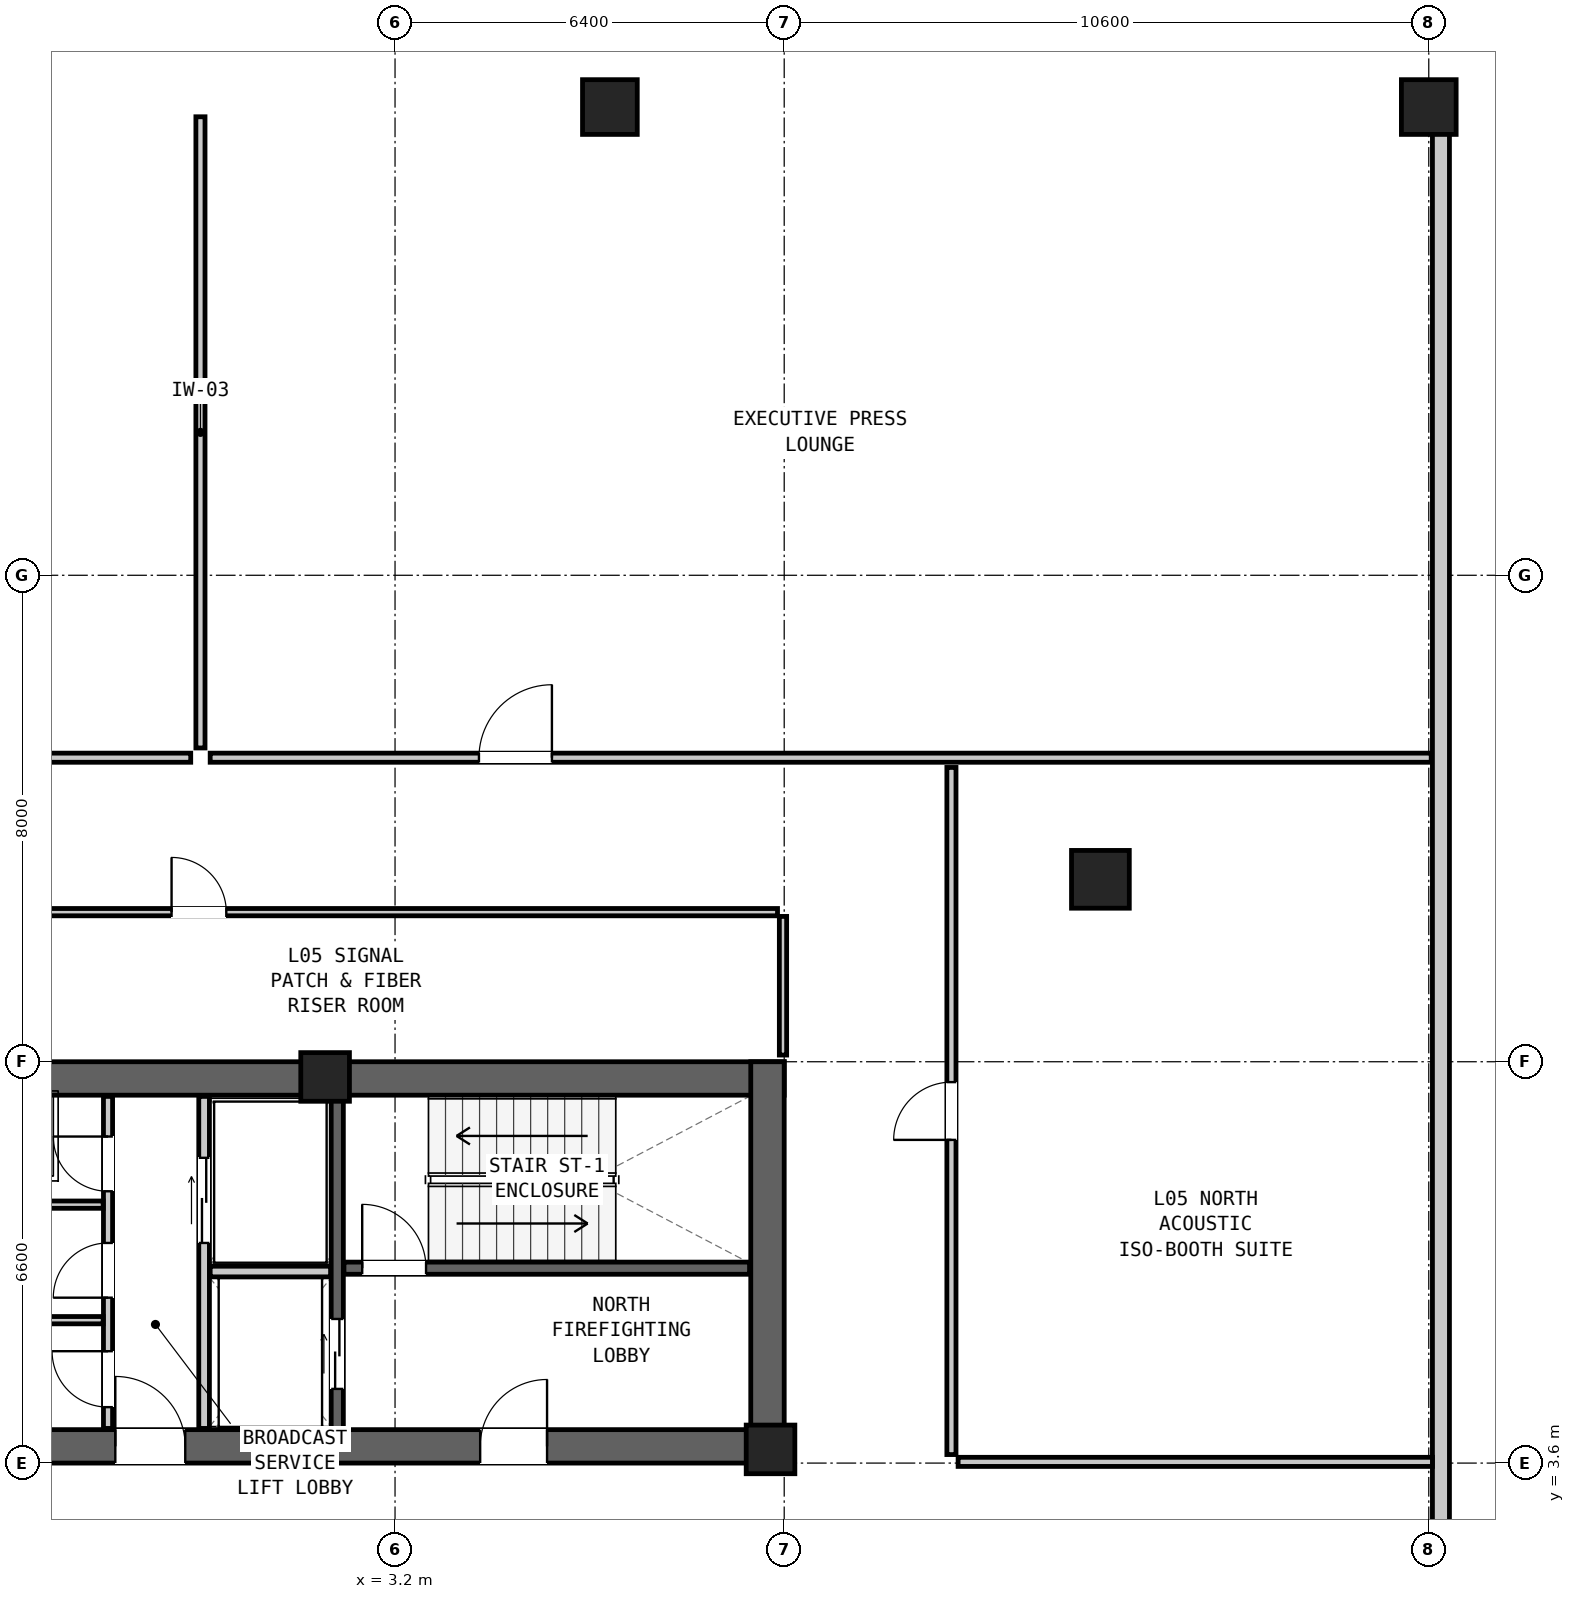
"""IFC4 building model, lengths in metres.
Left out: names, types, materials, properties, quantities, classifications, styles, units other than length and angle.
Written with IfcOpenShell. Run it as: python <this file> out.ifc"""

import sys

from ifc_helpers import new_model, si_unit, direction, frame, frame_2d, origin, origin_2d, place, context, subcontext, project, spatial, rectangle, hollow_rectangle, extrude, element, fill, save


model = new_model("IFC4")
c1 = context("Model", 3, precision=1e-05, world=origin(), true_north=direction((0.0, 1.0)))
c2 = subcontext(c1, "Body", "Model", "MODEL_VIEW")
j1 = project(units=[si_unit("LENGTHUNIT", "METRE"), si_unit("PLANEANGLEUNIT", "RADIAN")], contexts=[c1])
p1 = place(None, origin())
s1 = spatial("IfcSite", under=j1, at=p1, CompositionType="ELEMENT")
p2 = place(p1, origin())
s2 = spatial("IfcBuilding", under=s1, at=p2, CompositionType="ELEMENT")
p3 = place(p2, frame((0.0, 0.0, 21.9)))
s3 = spatial("IfcBuildingStorey", under=s2, at=p3, CompositionType="ELEMENT", Elevation=21.9)
p4 = place(p3, frame((-9.6, 9.925, 0.0), z_axis=(0.0, 0.0, 1.0), x_axis=(1.0, 0.0, 0.0)))
e1 = element("IfcWall", 1, at=p4, inside=s3, PredefinedType="SHEAR", context=c2, shape_type="SweptSolid", body=[
    extrude(rectangle(XDim=19.2, YDim=0.55, at=frame_2d((9.6, 0.0))), origin(), (0.0, 0.0, 1.0), 4.2),
])
p5 = place(p3, frame((-9.6, 3.875, 0.0), z_axis=(0.0, 0.0, 1.0), x_axis=(1.0, 0.0, 0.0)))
e2 = element("IfcWall", 2, at=p5, inside=s3, PredefinedType="SHEAR", context=c2, shape_type="SweptSolid", body=[
    extrude(rectangle(XDim=19.2, YDim=0.55, at=frame_2d((9.6, 0.0))), origin(), (0.0, 0.0, 1.0), 4.2),
])
p6 = place(p5, frame((14.2, 0.0, 0.0)))
e3 = element("IfcOpeningElement", 3, at=p6, cuts=e2, PredefinedType="OPENING", context=c2, shape_type="SweptSolid", body=[
    extrude(rectangle(XDim=1.1, YDim=2.08, at=frame_2d((0.55, 1.04))), frame((0.0, 0.287, 0.0), z_axis=(0.0, -1.0, 0.0), x_axis=(1.0, 0.0, 0.0)), (0.0, 0.0, 1.0), 0.574),
])
p7 = place(p5, frame((8.2, 0.0, 0.0)))
e4 = element("IfcOpeningElement", 4, at=p7, cuts=e2, PredefinedType="OPENING", context=c2, shape_type="SweptSolid", body=[
    extrude(rectangle(XDim=1.15, YDim=2.1, at=frame_2d((0.575, 1.05))), frame((0.0, 0.287, 0.0), z_axis=(0.0, -1.0, 0.0), x_axis=(1.0, 0.0, 0.0)), (0.0, 0.0, 1.0), 0.574),
])
p8 = place(p5, frame((0.9, 0.0, 0.0)))
e5 = element("IfcOpeningElement", 5, at=p8, cuts=e2, PredefinedType="OPENING", context=c2, shape_type="SweptSolid", body=[
    extrude(rectangle(XDim=0.95, YDim=2.1, at=frame_2d((0.475, 1.05))), frame((0.0, 0.287, 0.0), z_axis=(0.0, -1.0, 0.0), x_axis=(1.0, 0.0, 0.0)), (0.0, 0.0, 1.0), 0.574),
])
p9 = place(p5, frame((3.6, 0.0, 0.0)))
e6 = element("IfcOpeningElement", 6, at=p9, cuts=e2, PredefinedType="OPENING", context=c2, shape_type="SweptSolid", body=[
    extrude(rectangle(XDim=1.6, YDim=2.12, at=frame_2d((0.8, 1.06))), frame((0.0, 0.287, 0.0), z_axis=(0.0, -1.0, 0.0), x_axis=(1.0, 0.0, 0.0)), (0.0, 0.0, 1.0), 0.574),
])
p10 = place(p3, frame((9.325, 3.6, 0.0), z_axis=(0.0, 0.0, 1.0), x_axis=(0.0, 1.0, 0.0)))
e7 = element("IfcWall", 7, at=p10, inside=s3, PredefinedType="SHEAR", context=c2, shape_type="SweptSolid", body=[
    extrude(rectangle(XDim=6.6, YDim=0.55, at=frame_2d((3.3, 0.0))), origin(), (0.0, 0.0, 1.0), 4.2),
])
p11 = place(p3, frame((14.8, 13.2, 0.0), z_axis=(0.0, 0.0, 1.0), x_axis=(1.0, 0.0, 0.0)))
e8 = element("IfcColumn", 8, at=p11, inside=s3, PredefinedType="COLUMN", context=c2, shape_type="SweptSolid", body=[
    extrude(hollow_rectangle(XDim=0.95, YDim=0.95, WallThickness=0.06, at=origin_2d()), origin(), (0.0, 0.0, 1.0), 4.2),
])
for number, where, z_axis, x_axis in (
    (9, (20.2, 25.9, 0.0), (0.0, 0.0, 1.0), (1.0, 0.0, 0.0)),
    (10, (6.733, 25.9, 0.0), (0.0, 0.0, 1.0), (1.0, 0.0, 0.0)),
):
    element("IfcColumn", number, at=place(p3, frame(where, z_axis=z_axis, x_axis=x_axis)), inside=s3, PredefinedType="COLUMN", context=c2, shape_type="SweptSolid", body=[
        extrude(hollow_rectangle(XDim=0.9, YDim=0.9, WallThickness=0.055, at=origin_2d()), origin(), (0.0, 0.0, 1.0), 4.2),
    ])
for number, where, z_axis, x_axis in (
    (11, (2.05, 9.95, 0.0), (0.0, 0.0, 1.0), (1.0, 0.0, 0.0)),
    (12, (9.375, 3.825, 0.0), (0.0, 0.0, 1.0), (1.0, 0.0, 0.0)),
):
    element("IfcColumn", number, at=place(p3, frame(where, z_axis=z_axis, x_axis=x_axis)), inside=s3, PredefinedType="COLUMN", context=c2, shape_type="SweptSolid", body=[
        extrude(rectangle(XDim=0.8, YDim=0.8, at=origin_2d()), origin(), (0.0, 0.0, 1.0), 4.2),
    ])
p12 = place(p3, frame((2.36, 6.805, 0.0), z_axis=(0.0, 0.0, 1.0), x_axis=(1.0, 0.0, 0.0)))
e13 = element("IfcWall", 13, at=p12, inside=s3, PredefinedType="SHEAR", context=c2, shape_type="SweptSolid", body=[
    extrude(rectangle(XDim=6.67, YDim=0.2, at=frame_2d((3.335, 0.0))), origin(), (0.0, 0.0, 1.0), 3.98),
])
p13 = place(p12, frame((0.3, 0.0, 0.0)))
e14 = element("IfcOpeningElement", 14, at=p13, cuts=e13, PredefinedType="OPENING", context=c2, shape_type="SweptSolid", body=[
    extrude(rectangle(XDim=1.05, YDim=2.08, at=frame_2d((0.525, 1.04))), frame((0.0, 0.112, 0.0), z_axis=(0.0, -1.0, 0.0), x_axis=(1.0, 0.0, 0.0)), (0.0, 0.0, 1.0), 0.224),
])
p14 = place(p3, frame((2.25, 4.17, 0.0), z_axis=(0.0, 0.0, 1.0), x_axis=(0.0, 1.0, 0.0)))
e15 = element("IfcWall", 15, at=p14, inside=s3, PredefinedType="SHEAR", context=c2, shape_type="SweptSolid", body=[
    extrude(rectangle(XDim=5.46, YDim=0.2, at=frame_2d((2.73, 0.0))), origin(), (0.0, 0.0, 1.0), 3.98),
])
p15 = place(p14, frame((0.65, 0.0, 0.0)))
e16 = element("IfcOpeningElement", 16, at=p15, cuts=e15, PredefinedType="OPENING", context=c2, shape_type="SweptSolid", body=[
    extrude(rectangle(XDim=1.15, YDim=2.08, at=frame_2d((0.575, 1.04))), frame((0.0, 0.112, 0.0), z_axis=(0.0, -1.0, 0.0), x_axis=(1.0, 0.0, 0.0)), (0.0, 0.0, 1.0), 0.224),
])
p16 = place(p3, frame((0.06, 4.17, 0.0), z_axis=(0.0, 0.0, 1.0), x_axis=(0.0, 1.0, 0.0)))
e17 = element("IfcWall", 17, at=p16, inside=s3, PredefinedType="PARTITIONING", context=c2, shape_type="SweptSolid", body=[
    extrude(rectangle(XDim=5.46, YDim=0.175, at=frame_2d((2.73, 0.0))), origin(), (0.0, 0.0, 1.0), 3.98),
])
p17 = place(p16, frame((3.05, 0.0, 0.0)))
e18 = element("IfcOpeningElement", 18, at=p17, cuts=e17, PredefinedType="OPENING", context=c2, shape_type="SweptSolid", body=[
    extrude(rectangle(XDim=1.4, YDim=2.12, at=frame_2d((0.7, 1.06))), frame((0.0, 0.1, 0.0), z_axis=(0.0, -1.0, 0.0), x_axis=(1.0, 0.0, 0.0)), (0.0, 0.0, 1.0), 0.199),
])
p18 = place(p3, frame((0.16, 6.75, 0.0), z_axis=(0.0, 0.0, 1.0), x_axis=(1.0, 0.0, 0.0)))
e19 = element("IfcWall", 19, at=p18, inside=s3, PredefinedType="PARTITIONING", context=c2, shape_type="SweptSolid", body=[
    extrude(rectangle(XDim=1.98, YDim=0.175, at=frame_2d((0.99, 0.0))), origin(), (0.0, 0.0, 1.0), 3.98),
])
p19 = place(p3, frame((-1.52, 4.17, 0.0), z_axis=(0.0, 0.0, 1.0), x_axis=(0.0, 1.0, 0.0)))
e20 = element("IfcWall", 20, at=p19, inside=s3, PredefinedType="PARTITIONING", context=c2, shape_type="SweptSolid", body=[
    extrude(rectangle(XDim=5.46, YDim=0.15, at=frame_2d((2.73, 0.0))), origin(), (0.0, 0.0, 1.0), 3.98),
])
p20 = place(p19, frame((3.9, 0.0, 0.0)))
e21 = element("IfcOpeningElement", 21, at=p20, cuts=e20, PredefinedType="OPENING", context=c2, shape_type="SweptSolid", body=[
    extrude(rectangle(XDim=0.9, YDim=2.05, at=frame_2d((0.45, 1.025))), frame((0.0, 0.087, 0.0), z_axis=(0.0, -1.0, 0.0), x_axis=(1.0, 0.0, 0.0)), (0.0, 0.0, 1.0), 0.174),
])
p21 = place(p19, frame((2.15, 0.0, 0.0)))
e22 = element("IfcOpeningElement", 22, at=p21, cuts=e20, PredefinedType="OPENING", context=c2, shape_type="SweptSolid", body=[
    extrude(rectangle(XDim=0.9, YDim=2.05, at=frame_2d((0.45, 1.025))), frame((0.0, 0.087, 0.0), z_axis=(0.0, -1.0, 0.0), x_axis=(1.0, 0.0, 0.0)), (0.0, 0.0, 1.0), 0.174),
])
p22 = place(p19, frame((0.35, 0.0, 0.0)))
e23 = element("IfcOpeningElement", 23, at=p22, cuts=e20, PredefinedType="OPENING", context=c2, shape_type="SweptSolid", body=[
    extrude(rectangle(XDim=0.92, YDim=2.1, at=frame_2d((0.46, 1.05))), frame((0.0, 0.087, 0.0), z_axis=(0.0, -1.0, 0.0), x_axis=(1.0, 0.0, 0.0)), (0.0, 0.0, 1.0), 0.174),
])
for number, where, z_axis, x_axis in (
    (24, (-2.96, 5.95, 0.0), (0.0, 0.0, 1.0), (1.0, 0.0, 0.0)),
    (25, (-2.96, 7.85, 0.0), (0.0, 0.0, 1.0), (1.0, 0.0, 0.0)),
):
    element("IfcWall", number, at=place(p3, frame(where, z_axis=z_axis, x_axis=x_axis)), inside=s3, PredefinedType="PARTITIONING", context=c2, shape_type="SweptSolid", body=[
        extrude(rectangle(XDim=1.36, YDim=0.12, at=frame_2d((0.68, 0.0))), origin(), (0.0, 0.0, 1.0), 3.98),
    ])
p23 = place(p3, frame((20.4, -25.74, 0.0), z_axis=(0.0, 0.0, 1.0), x_axis=(0.0, 1.0, 0.0)))
e26 = element("IfcWall", 26, at=p23, inside=s3, PredefinedType="MOVABLE", context=c2, shape_type="SweptSolid", body=[
    extrude(rectangle(XDim=51.48, YDim=0.28, at=frame_2d((25.74, 0.0))), origin(), (0.0, 0.0, 1.0), 3.98),
])
p24 = place(p23, frame((25.255, 0.0, 0.0)))
e27 = element("IfcOpeningElement", 27, at=p24, cuts=e26, PredefinedType="OPENING", context=c2, shape_type="SweptSolid", body=[
    extrude(rectangle(XDim=2.0, YDim=2.14, at=frame_2d((1.0, 1.07))), frame((0.0, 0.152, 0.0), z_axis=(0.0, -1.0, 0.0), x_axis=(1.0, 0.0, 0.0)), (0.0, 0.0, 1.0), 0.304),
])
p25 = place(p3, frame((-28.24, 15.2, 0.0), z_axis=(0.0, 0.0, 1.0), x_axis=(1.0, 0.0, 0.0)))
e28 = element("IfcWall", 28, at=p25, inside=s3, PredefinedType="PARTITIONING", context=c2, shape_type="SweptSolid", body=[
    extrude(rectangle(XDim=28.08, YDim=0.15, at=frame_2d((14.04, 0.0))), origin(), (0.0, 0.0, 1.0), 3.98),
])
p26 = place(p25, frame((21.302, 0.0, 0.0)))
e29 = element("IfcOpeningElement", 29, at=p26, cuts=e28, PredefinedType="OPENING", context=c2, shape_type="SweptSolid", body=[
    extrude(rectangle(XDim=1.2, YDim=2.1, at=frame_2d((0.6, 1.05))), frame((0.0, 0.087, 0.0), z_axis=(0.0, -1.0, 0.0), x_axis=(1.0, 0.0, 0.0)), (0.0, 0.0, 1.0), 0.174),
])
p27 = place(p3, frame((0.16, 15.2, 0.0), z_axis=(0.0, 0.0, 1.0), x_axis=(1.0, 0.0, 0.0)))
e30 = element("IfcWall", 30, at=p27, inside=s3, PredefinedType="PARTITIONING", context=c2, shape_type="SweptSolid", body=[
    extrude(rectangle(XDim=20.08, YDim=0.15, at=frame_2d((10.04, 0.0))), origin(), (0.0, 0.0, 1.0), 3.98),
])
p28 = place(p27, frame((4.42, 0.0, 0.0)))
e31 = element("IfcOpeningElement", 31, at=p28, cuts=e30, PredefinedType="OPENING", context=c2, shape_type="SweptSolid", body=[
    extrude(rectangle(XDim=1.2, YDim=2.1, at=frame_2d((0.6, 1.05))), frame((0.0, 0.087, 0.0), z_axis=(0.0, -1.0, 0.0), x_axis=(1.0, 0.0, 0.0)), (0.0, 0.0, 1.0), 0.174),
])
p29 = place(p3, frame((0.0, 15.36, 0.0), z_axis=(0.0, 0.0, 1.0), x_axis=(0.0, 1.0, 0.0)))
e32 = element("IfcWall", 32, at=p29, inside=s3, PredefinedType="PARTITIONING", context=c2, shape_type="SweptSolid", body=[
    extrude(rectangle(XDim=10.38, YDim=0.15, at=frame_2d((5.19, 0.0))), origin(), (0.0, 0.0, 1.0), 3.424),
])
p30 = place(p3, frame((12.35, 3.74, 0.0), z_axis=(0.0, 0.0, 1.0), x_axis=(0.0, 1.0, 0.0)))
e33 = element("IfcWall", 33, at=p30, inside=s3, PredefinedType="PARTITIONING", context=c2, shape_type="SweptSolid", body=[
    extrude(rectangle(XDim=11.3, YDim=0.15, at=frame_2d((5.65, 0.0))), origin(), (0.0, 0.0, 1.0), 3.98),
])
p31 = place(p30, frame((5.175, 0.0, 0.0)))
e34 = element("IfcOpeningElement", 34, at=p31, cuts=e33, PredefinedType="OPENING", context=c2, shape_type="SweptSolid", body=[
    extrude(rectangle(XDim=0.95, YDim=2.1, at=frame_2d((0.475, 1.05))), frame((0.0, 0.087, 0.0), z_axis=(0.0, -1.0, 0.0), x_axis=(1.0, 0.0, 0.0)), (0.0, 0.0, 1.0), 0.174),
])
p32 = place(p3, frame((12.46, 3.62, 0.0), z_axis=(0.0, 0.0, 1.0), x_axis=(1.0, 0.0, 0.0)))
e35 = element("IfcWall", 35, at=p32, inside=s3, PredefinedType="PARTITIONING", context=c2, shape_type="SweptSolid", body=[
    extrude(rectangle(XDim=7.8, YDim=0.15, at=frame_2d((3.9, 0.0))), origin(), (0.0, 0.0, 1.0), 2.949),
])
p33 = place(p3, frame((-9.49, 12.66, 0.0), z_axis=(0.0, 0.0, 1.0), x_axis=(1.0, 0.0, 0.0)))
e36 = element("IfcWall", 36, at=p33, inside=s3, PredefinedType="PARTITIONING", context=c2, shape_type="SweptSolid", body=[
    extrude(rectangle(XDim=18.98, YDim=0.12, at=frame_2d((9.49, 0.0))), origin(), (0.0, 0.0, 1.0), 3.98),
])
p34 = place(p33, frame((9.015, 0.0, 0.0)))
e37 = element("IfcOpeningElement", 37, at=p34, cuts=e36, PredefinedType="OPENING", context=c2, shape_type="SweptSolid", body=[
    extrude(rectangle(XDim=0.9, YDim=2.05, at=frame_2d((0.45, 1.025))), frame((0.0, 0.072, 0.0), z_axis=(0.0, -1.0, 0.0), x_axis=(1.0, 0.0, 0.0)), (0.0, 0.0, 1.0), 0.144),
])
p35 = place(p3, frame((9.58, 10.31, 0.0), z_axis=(0.0, 0.0, 1.0), x_axis=(0.0, 1.0, 0.0)))
e38 = element("IfcWall", 38, at=p35, inside=s3, PredefinedType="PARTITIONING", context=c2, shape_type="SweptSolid", body=[
    extrude(rectangle(XDim=2.28, YDim=0.12, at=frame_2d((1.14, 0.0))), origin(), (0.0, 0.0, 1.0), 2.949),
])
p36 = place(p13, origin())
e39 = element("IfcDoor", 39, at=p36, inside=s3, OperationType="SINGLE_SWING_LEFT", PredefinedType="DOOR", context=c2, shape_type="SweptSolid", body=[
    extrude(rectangle(XDim=1.05, YDim=2.08, at=frame_2d((0.525, 1.04))), frame((0.0, 0.025, 0.0), z_axis=(0.0, -1.0, 0.0), x_axis=(1.0, 0.0, 0.0)), (0.0, 0.0, 1.0), 0.05),
])
fill(e14, e39)
p37 = place(p6, origin())
e40 = element("IfcDoor", 40, at=p37, inside=s3, OperationType="SINGLE_SWING_RIGHT", PredefinedType="DOOR", context=c2, shape_type="SweptSolid", body=[
    extrude(rectangle(XDim=1.1, YDim=2.08, at=frame_2d((0.55, 1.04))), frame((0.0, 0.025, 0.0), z_axis=(0.0, -1.0, 0.0), x_axis=(1.0, 0.0, 0.0)), (0.0, 0.0, 1.0), 0.05),
])
fill(e3, e40)
p38 = place(p15, origin())
e41 = element("IfcDoor", 41, at=p38, inside=s3, OperationType="DOUBLE_DOOR_SLIDING", PredefinedType="DOOR", context=c2, shape_type="SweptSolid", body=[
    extrude(rectangle(XDim=1.15, YDim=2.08, at=frame_2d((0.575, 1.04))), frame((0.0, 0.025, 0.0), z_axis=(0.0, -1.0, 0.0), x_axis=(1.0, 0.0, 0.0)), (0.0, 0.0, 1.0), 0.05),
])
fill(e16, e41)
p39 = place(p17, origin())
e42 = element("IfcDoor", 42, at=p39, inside=s3, OperationType="DOUBLE_DOOR_SLIDING", PredefinedType="DOOR", context=c2, shape_type="SweptSolid", body=[
    extrude(rectangle(XDim=1.4, YDim=2.12, at=frame_2d((0.7, 1.06))), frame((0.0, 0.025, 0.0), z_axis=(0.0, -1.0, 0.0), x_axis=(1.0, 0.0, 0.0)), (0.0, 0.0, 1.0), 0.05),
])
fill(e18, e42)
p40 = place(p7, origin())
e43 = element("IfcDoor", 43, at=p40, inside=s3, OperationType="SINGLE_SWING_LEFT", PredefinedType="DOOR", context=c2, shape_type="SweptSolid", body=[
    extrude(rectangle(XDim=1.15, YDim=2.1, at=frame_2d((0.575, 1.05))), frame((0.0, 0.025, 0.0), z_axis=(0.0, -1.0, 0.0), x_axis=(1.0, 0.0, 0.0)), (0.0, 0.0, 1.0), 0.05),
])
fill(e4, e43)
p41 = place(p20, origin())
e44 = element("IfcDoor", 44, at=p41, inside=s3, OperationType="SINGLE_SWING_RIGHT", PredefinedType="DOOR", context=c2, shape_type="SweptSolid", body=[
    extrude(rectangle(XDim=0.9, YDim=2.05, at=frame_2d((0.45, 1.025))), frame((0.0, 0.025, 0.0), z_axis=(0.0, -1.0, 0.0), x_axis=(1.0, 0.0, 0.0)), (0.0, 0.0, 1.0), 0.05),
])
fill(e21, e44)
p42 = place(p21, origin())
e45 = element("IfcDoor", 45, at=p42, inside=s3, OperationType="SINGLE_SWING_LEFT", PredefinedType="DOOR", context=c2, shape_type="SweptSolid", body=[
    extrude(rectangle(XDim=0.9, YDim=2.05, at=frame_2d((0.45, 1.025))), frame((0.0, 0.025, 0.0), z_axis=(0.0, -1.0, 0.0), x_axis=(1.0, 0.0, 0.0)), (0.0, 0.0, 1.0), 0.05),
])
fill(e22, e45)
p43 = place(p22, origin())
e46 = element("IfcDoor", 46, at=p43, inside=s3, OperationType="SINGLE_SWING_RIGHT", PredefinedType="DOOR", context=c2, shape_type="SweptSolid", body=[
    extrude(rectangle(XDim=0.92, YDim=2.1, at=frame_2d((0.46, 1.05))), frame((0.0, 0.025, 0.0), z_axis=(0.0, -1.0, 0.0), x_axis=(1.0, 0.0, 0.0)), (0.0, 0.0, 1.0), 0.05),
])
fill(e23, e46)
p44 = place(p28, origin())
e47 = element("IfcDoor", 47, at=p44, inside=s3, OperationType="SINGLE_SWING_RIGHT", PredefinedType="DOOR", context=c2, shape_type="SweptSolid", body=[
    extrude(rectangle(XDim=1.2, YDim=2.1, at=frame_2d((0.6, 1.05))), frame((0.0, 0.025, 0.0), z_axis=(0.0, -1.0, 0.0), x_axis=(1.0, 0.0, 0.0)), (0.0, 0.0, 1.0), 0.05),
])
fill(e31, e47)
p45 = place(p31, origin())
e48 = element("IfcDoor", 48, at=p45, inside=s3, OperationType="SINGLE_SWING_LEFT", PredefinedType="DOOR", context=c2, shape_type="SweptSolid", body=[
    extrude(rectangle(XDim=0.95, YDim=2.1, at=frame_2d((0.475, 1.05))), frame((0.0, 0.025, 0.0), z_axis=(0.0, -1.0, 0.0), x_axis=(1.0, 0.0, 0.0)), (0.0, 0.0, 1.0), 0.05),
])
fill(e34, e48)
p46 = place(p34, origin())
e49 = element("IfcDoor", 49, at=p46, inside=s3, OperationType="SINGLE_SWING_LEFT", PredefinedType="DOOR", context=c2, shape_type="SweptSolid", body=[
    extrude(rectangle(XDim=0.9, YDim=2.05, at=frame_2d((0.45, 1.025))), frame((0.0, 0.025, 0.0), z_axis=(0.0, -1.0, 0.0), x_axis=(1.0, 0.0, 0.0)), (0.0, 0.0, 1.0), 0.05),
])
fill(e37, e49)
save(model, sys.argv[1])
